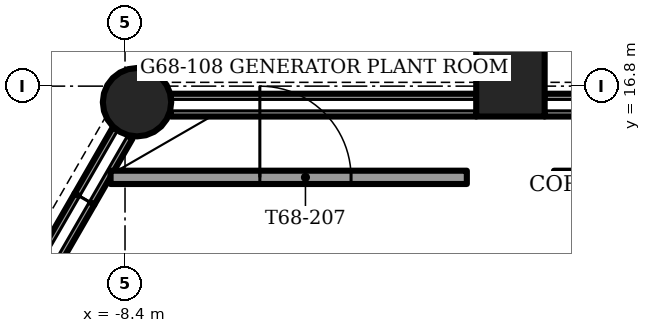
"""IFC4 building model, lengths in metres.
Left out: names, types, materials, properties, quantities, classifications, styles, units other than length and angle.
Written with IfcOpenShell. Run it as: python <this file> out.ifc"""

import sys

from ifc_helpers import new_model, si_unit, direction, frame, frame_2d, origin, origin_2d, place, context, subcontext, project, spatial, rectangle, circle, extrude, element, fill, save


model = new_model("IFC4")
c1 = context("Model", 3, precision=1e-05, world=origin(), true_north=direction((0.0, 1.0)))
c2 = subcontext(c1, "Body", "Model", "MODEL_VIEW")
j1 = project(units=[si_unit("LENGTHUNIT", "METRE"), si_unit("PLANEANGLEUNIT", "RADIAN")], contexts=[c1])
p1 = place(None, origin())
s1 = spatial("IfcSite", under=j1, at=p1, CompositionType="ELEMENT")
p2 = place(p1, origin())
s2 = spatial("IfcBuilding", under=s1, at=p2, CompositionType="ELEMENT")
p3 = place(p2, frame((0.0, 0.0, 275.0)))
s3 = spatial("IfcBuildingStorey", under=s2, at=p3, CompositionType="ELEMENT", Elevation=275.0)
p4 = place(p3, frame((-8.242, 16.589, -1.2), z_axis=(0.0, 0.0, 1.0), x_axis=(1.0, 0.0, 0.0)))
e1 = element("IfcColumn", 1, at=p4, inside=s3, PredefinedType="COLUMN", context=c2, shape_type="SweptSolid", body=[
    extrude(circle(Radius=0.45, at=origin_2d()), origin(), (0.0, 0.0, 1.0), 4.5),
])
p5 = place(p3, frame((-3.329, 16.85, -1.2), z_axis=(0.0, 0.0, 1.0), x_axis=(1.0, 0.0, 0.0)))
e2 = element("IfcColumn", 2, at=p5, inside=s3, PredefinedType="COLUMN", context=c2, shape_type="SweptSolid", body=[
    extrude(rectangle(XDim=0.9, YDim=0.9, at=origin_2d()), origin(), (0.0, 0.0, 1.0), 4.5),
])
p6 = place(p3, frame((2.879, 16.55, 0.0), z_axis=(0.0, 0.0, 1.0), x_axis=(-1.0, 0.0, 0.0)))
e3 = element("IfcWall", 3, at=p6, inside=s3, PredefinedType="SOLIDWALL", context=c2, shape_type="SweptSolid", body=[
    extrude(rectangle(XDim=5.759, YDim=0.3, at=frame_2d((2.879, 0.0))), origin(), (0.0, 0.0, 1.0), 1.0),
])
p7 = place(p3, frame((-3.779, 16.55, 0.0), z_axis=(0.0, 0.0, 1.0), x_axis=(-1.0, 0.0, 0.0)))
e4 = element("IfcWall", 4, at=p7, inside=s3, PredefinedType="SOLIDWALL", context=c2, shape_type="SweptSolid", body=[
    extrude(rectangle(XDim=4.017, YDim=0.3, at=frame_2d((2.008, 0.0))), origin(), (0.0, 0.0, 1.0), 1.0),
])
p8 = place(p3, frame((-8.432, 16.182, 0.0), z_axis=(0.0, 0.0, 1.0), x_axis=(-0.500143783026, -0.865942374699, 0.0)))
e5 = element("IfcWall", 5, at=p8, inside=s3, PredefinedType="SOLIDWALL", context=c2, shape_type="SweptSolid", body=[
    extrude(rectangle(XDim=1.003, YDim=0.3, at=frame_2d((0.501, 0.0))), origin(), (0.0, 0.0, 1.0), 1.0),
])
p9 = place(p3, frame((-8.934, 15.314, 0.0), z_axis=(0.0, 0.0, 1.0), x_axis=(-0.500038395149, -0.8660032352, 0.0)))
e6 = element("IfcWall", 6, at=p9, inside=s3, PredefinedType="SOLIDWALL", context=c2, shape_type="SweptSolid", body=[
    extrude(rectangle(XDim=1.003, YDim=0.3, at=frame_2d((0.502, 0.0))), origin(), (0.0, 0.0, 1.0), 1.0),
])
p10 = place(p3, frame((-8.59, 15.6, 0.0), z_axis=(0.0, 0.0, 1.0), x_axis=(1.0, 0.0, 0.0)))
e7 = element("IfcWall", 7, at=p10, inside=s3, PredefinedType="PARTITIONING", context=c2, shape_type="SweptSolid", body=[
    extrude(rectangle(XDim=4.687, YDim=0.175, at=frame_2d((2.344, 0.0))), origin(), (0.0, 0.0, 1.0), 4.2),
])
p11 = place(p10, frame((1.964, 0.0, 0.0)))
e8 = element("IfcOpeningElement", 8, at=p11, cuts=e7, PredefinedType="OPENING", context=c2, shape_type="SweptSolid", body=[
    extrude(rectangle(XDim=1.2, YDim=2.1, at=frame_2d((0.6, 1.05))), frame((0.0, 0.087, 0.0), z_axis=(0.0, -1.0, 0.0), x_axis=(1.0, 0.0, 0.0)), (0.0, 0.0, 1.0), 0.175),
])
p12 = place(p3, frame((-2.756, 15.6, 0.0), z_axis=(0.0, 0.0, 1.0), x_axis=(1.0, 0.0, 0.0)))
e9 = element("IfcWall", 9, at=p12, inside=s3, PredefinedType="PARTITIONING", context=c2, shape_type="SweptSolid", body=[
    extrude(rectangle(XDim=5.512, YDim=0.175, at=frame_2d((2.756, 0.0))), origin(), (0.0, 0.0, 1.0), 4.2),
])
p13 = place(p11, origin())
e10 = element("IfcDoor", 10, at=p13, inside=s3, OperationType="SINGLE_SWING_LEFT", PredefinedType="DOOR", context=c2, shape_type="SweptSolid", body=[
    extrude(rectangle(XDim=1.2, YDim=2.1, at=frame_2d((0.6, 1.05))), frame((0.0, 0.025, 0.0), z_axis=(0.0, -1.0, 0.0), x_axis=(1.0, 0.0, 0.0)), (0.0, 0.0, 1.0), 0.05),
])
fill(e8, e10)
save(model, sys.argv[1])
